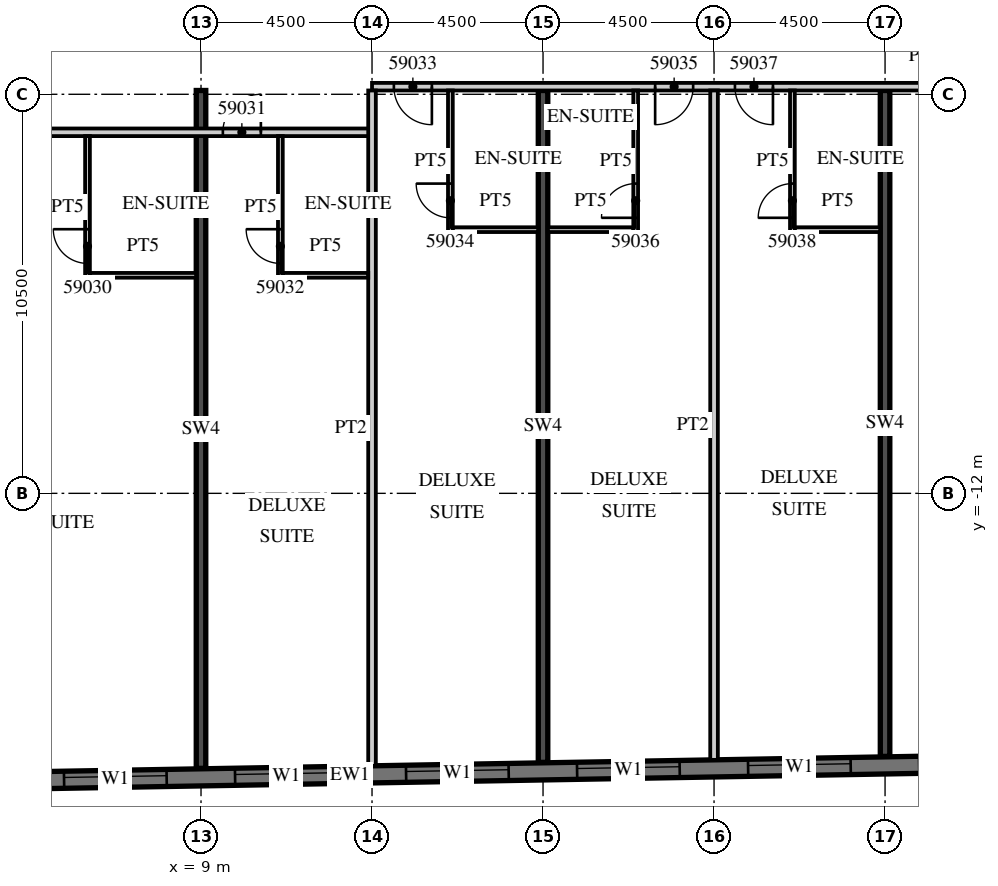
"""IFC4 building model, lengths in metres.
Left out: names, types, materials, properties, quantities, classifications, styles, units other than length and angle.
Written with IfcOpenShell. Run it as: python <this file> out.ifc"""

import sys

from ifc_helpers import new_model, si_unit, direction, frame, frame_2d, origin, place, context, subcontext, project, spatial, rectangle, extrude, element, fill, save


model = new_model("IFC4")
c1 = context("Model", 3, precision=1e-05, world=origin(), true_north=direction((0.0, 1.0)))
c2 = subcontext(c1, "Body", "Model", "MODEL_VIEW")
j1 = project(units=[si_unit("LENGTHUNIT", "METRE"), si_unit("PLANEANGLEUNIT", "RADIAN")], contexts=[c1])
p1 = place(None, origin())
s1 = spatial("IfcSite", under=j1, at=p1, CompositionType="ELEMENT")
p2 = place(p1, origin())
s2 = spatial("IfcBuilding", under=s1, at=p2, CompositionType="ELEMENT")
p3 = place(p2, frame((0.0, 0.0, 240.8)))
s3 = spatial("IfcBuildingStorey", under=s2, at=p3, CompositionType="ELEMENT", Elevation=240.8)
p4 = place(p3, frame((9.0, -19.236, 0.0), z_axis=(0.0, 0.0, 1.0), x_axis=(0.0, 1.0, 0.0)))
e1 = element("IfcWall", 1, at=p4, inside=s3, PredefinedType="SHEAR", context=c2, shape_type="SweptSolid", body=[
    extrude(rectangle(XDim=17.836, YDim=0.25, at=frame_2d((8.918, 0.0))), origin(), (0.0, 0.0, 1.0), 3.3),
])
p5 = place(p3, frame((18.0, -19.079, 0.0), z_axis=(0.0, 0.0, 1.0), x_axis=(0.0, 1.0, 0.0)))
e2 = element("IfcWall", 2, at=p5, inside=s3, PredefinedType="SHEAR", context=c2, shape_type="SweptSolid", body=[
    extrude(rectangle(XDim=17.679, YDim=0.25, at=frame_2d((8.84, 0.0))), origin(), (0.0, 0.0, 1.0), 3.3),
])
p6 = place(p3, frame((27.0, -18.922, 0.0), z_axis=(0.0, 0.0, 1.0), x_axis=(0.0, 1.0, 0.0)))
e3 = element("IfcWall", 3, at=p6, inside=s3, PredefinedType="SHEAR", context=c2, shape_type="SweptSolid", body=[
    extrude(rectangle(XDim=17.522, YDim=0.25, at=frame_2d((8.761, 0.0))), origin(), (0.0, 0.0, 1.0), 3.3),
])
p7 = place(p3, frame((-13.504, -19.866, 0.0), z_axis=(0.0, 0.0, 1.0), x_axis=(0.999847672978, 0.017453676992, 0.0)))
e4 = element("IfcWall", 4, at=p7, inside=s3, PredefinedType="SOLIDWALL", context=c2, shape_type="SweptSolid", body=[
    extrude(rectangle(XDim=52.86, YDim=0.45, at=frame_2d((26.43, 0.0))), origin(), (0.0, 0.0, 1.0), 3.02),
])
p8 = place(p7, frame((0.9, 0.0, 0.45)))
e5 = element("IfcOpeningElement", 5, at=p8, cuts=e4, PredefinedType="OPENING", context=c2, shape_type="SweptSolid", body=[
    extrude(rectangle(XDim=2.7, YDim=2.25, at=frame_2d((1.35, 1.125))), frame((0.0, 0.235, 0.0), z_axis=(0.0, -1.0, 0.0), x_axis=(1.0, 0.0, 0.0)), (0.0, 0.0, 1.0), 0.47),
])
p9 = place(p7, frame((5.401, 0.0, 0.45)))
e6 = element("IfcOpeningElement", 6, at=p9, cuts=e4, PredefinedType="OPENING", context=c2, shape_type="SweptSolid", body=[
    extrude(rectangle(XDim=2.7, YDim=2.25, at=frame_2d((1.35, 1.125))), frame((0.0, 0.235, 0.0), z_axis=(0.0, -1.0, 0.0), x_axis=(1.0, 0.0, 0.0)), (0.0, 0.0, 1.0), 0.47),
])
p10 = place(p7, frame((9.902, 0.0, 0.45)))
e7 = element("IfcOpeningElement", 7, at=p10, cuts=e4, PredefinedType="OPENING", context=c2, shape_type="SweptSolid", body=[
    extrude(rectangle(XDim=2.7, YDim=2.25, at=frame_2d((1.35, 1.125))), frame((0.0, 0.235, 0.0), z_axis=(0.0, -1.0, 0.0), x_axis=(1.0, 0.0, 0.0)), (0.0, 0.0, 1.0), 0.47),
])
p11 = place(p7, frame((14.402, 0.0, 0.45)))
e8 = element("IfcOpeningElement", 8, at=p11, cuts=e4, PredefinedType="OPENING", context=c2, shape_type="SweptSolid", body=[
    extrude(rectangle(XDim=2.7, YDim=2.25, at=frame_2d((1.35, 1.125))), frame((0.0, 0.235, 0.0), z_axis=(0.0, -1.0, 0.0), x_axis=(1.0, 0.0, 0.0)), (0.0, 0.0, 1.0), 0.47),
])
p12 = place(p7, frame((18.903, 0.0, 0.45)))
e9 = element("IfcOpeningElement", 9, at=p12, cuts=e4, PredefinedType="OPENING", context=c2, shape_type="SweptSolid", body=[
    extrude(rectangle(XDim=2.7, YDim=2.25, at=frame_2d((1.35, 1.125))), frame((0.0, 0.235, 0.0), z_axis=(0.0, -1.0, 0.0), x_axis=(1.0, 0.0, 0.0)), (0.0, 0.0, 1.0), 0.47),
])
p13 = place(p7, frame((23.404, 0.0, 0.45)))
e10 = element("IfcOpeningElement", 10, at=p13, cuts=e4, PredefinedType="OPENING", context=c2, shape_type="SweptSolid", body=[
    extrude(rectangle(XDim=2.7, YDim=2.25, at=frame_2d((1.35, 1.125))), frame((0.0, 0.235, 0.0), z_axis=(0.0, -1.0, 0.0), x_axis=(1.0, 0.0, 0.0)), (0.0, 0.0, 1.0), 0.47),
])
p14 = place(p7, frame((27.904, 0.0, 0.45)))
e11 = element("IfcOpeningElement", 11, at=p14, cuts=e4, PredefinedType="OPENING", context=c2, shape_type="SweptSolid", body=[
    extrude(rectangle(XDim=2.7, YDim=2.25, at=frame_2d((1.35, 1.125))), frame((0.0, 0.235, 0.0), z_axis=(0.0, -1.0, 0.0), x_axis=(1.0, 0.0, 0.0)), (0.0, 0.0, 1.0), 0.47),
])
p15 = place(p7, frame((32.405, 0.0, 0.45)))
e12 = element("IfcOpeningElement", 12, at=p15, cuts=e4, PredefinedType="OPENING", context=c2, shape_type="SweptSolid", body=[
    extrude(rectangle(XDim=2.7, YDim=2.25, at=frame_2d((1.35, 1.125))), frame((0.0, 0.235, 0.0), z_axis=(0.0, -1.0, 0.0), x_axis=(1.0, 0.0, 0.0)), (0.0, 0.0, 1.0), 0.47),
])
p16 = place(p7, frame((36.906, 0.0, 0.45)))
e13 = element("IfcOpeningElement", 13, at=p16, cuts=e4, PredefinedType="OPENING", context=c2, shape_type="SweptSolid", body=[
    extrude(rectangle(XDim=2.7, YDim=2.25, at=frame_2d((1.35, 1.125))), frame((0.0, 0.235, 0.0), z_axis=(0.0, -1.0, 0.0), x_axis=(1.0, 0.0, 0.0)), (0.0, 0.0, 1.0), 0.47),
])
p17 = place(p7, frame((41.406, 0.0, 0.45)))
e14 = element("IfcOpeningElement", 14, at=p17, cuts=e4, PredefinedType="OPENING", context=c2, shape_type="SweptSolid", body=[
    extrude(rectangle(XDim=2.7, YDim=2.25, at=frame_2d((1.35, 1.125))), frame((0.0, 0.235, 0.0), z_axis=(0.0, -1.0, 0.0), x_axis=(1.0, 0.0, 0.0)), (0.0, 0.0, 1.0), 0.47),
])
p18 = place(p7, frame((45.907, 0.0, 0.45)))
e15 = element("IfcOpeningElement", 15, at=p18, cuts=e4, PredefinedType="OPENING", context=c2, shape_type="SweptSolid", body=[
    extrude(rectangle(XDim=2.7, YDim=2.25, at=frame_2d((1.35, 1.125))), frame((0.0, 0.235, 0.0), z_axis=(0.0, -1.0, 0.0), x_axis=(1.0, 0.0, 0.0)), (0.0, 0.0, 1.0), 0.47),
])
p19 = place(p3, frame((-13.5, -2.5, 0.0), z_axis=(0.0, 0.0, 1.0), x_axis=(1.0, 0.0, 0.0)))
e16 = element("IfcWall", 16, at=p19, inside=s3, PredefinedType="PARTITIONING", context=c2, shape_type="SweptSolid", body=[
    extrude(rectangle(XDim=27.0, YDim=0.2, at=frame_2d((13.5, 0.0))), origin(), (0.0, 0.0, 1.0), 3.02),
])
p20 = place(p19, frame((0.575, 0.0, 0.0)))
e17 = element("IfcOpeningElement", 17, at=p20, cuts=e16, PredefinedType="OPENING", context=c2, shape_type="SweptSolid", body=[
    extrude(rectangle(XDim=1.0, YDim=2.1, at=frame_2d((0.5, 1.05))), frame((0.0, 0.11, 0.0), z_axis=(0.0, -1.0, 0.0), x_axis=(1.0, 0.0, 0.0)), (0.0, 0.0, 1.0), 0.22),
])
p21 = place(p19, frame((9.863, 0.0, 0.0)))
e18 = element("IfcOpeningElement", 18, at=p21, cuts=e16, PredefinedType="OPENING", context=c2, shape_type="SweptSolid", body=[
    extrude(rectangle(XDim=1.2, YDim=2.1, at=frame_2d((0.6, 1.05))), frame((0.0, 0.11, 0.0), z_axis=(0.0, -1.0, 0.0), x_axis=(1.0, 0.0, 0.0)), (0.0, 0.0, 1.0), 0.22),
])
p22 = place(p19, frame((15.938, 0.0, 0.0)))
e19 = element("IfcOpeningElement", 19, at=p22, cuts=e16, PredefinedType="OPENING", context=c2, shape_type="SweptSolid", body=[
    extrude(rectangle(XDim=1.2, YDim=2.1, at=frame_2d((0.6, 1.05))), frame((0.0, 0.11, 0.0), z_axis=(0.0, -1.0, 0.0), x_axis=(1.0, 0.0, 0.0)), (0.0, 0.0, 1.0), 0.22),
])
p23 = place(p19, frame((23.075, 0.0, 0.0)))
e20 = element("IfcOpeningElement", 20, at=p23, cuts=e16, PredefinedType="OPENING", context=c2, shape_type="SweptSolid", body=[
    extrude(rectangle(XDim=1.0, YDim=2.1, at=frame_2d((0.5, 1.05))), frame((0.0, 0.11, 0.0), z_axis=(0.0, -1.0, 0.0), x_axis=(1.0, 0.0, 0.0)), (0.0, 0.0, 1.0), 0.22),
])
p24 = place(p3, frame((13.5, -1.3, 0.0), z_axis=(0.0, 0.0, 1.0), x_axis=(1.0, 0.0, 0.0)))
e21 = element("IfcWall", 21, at=p24, inside=s3, PredefinedType="PARTITIONING", context=c2, shape_type="SweptSolid", body=[
    extrude(rectangle(XDim=29.091, YDim=0.2, at=frame_2d((14.545, 0.0))), origin(), (0.0, 0.0, 1.0), 3.02),
])
p25 = place(p24, frame((0.575, 0.0, 0.0)))
e22 = element("IfcOpeningElement", 22, at=p25, cuts=e21, PredefinedType="OPENING", context=c2, shape_type="SweptSolid", body=[
    extrude(rectangle(XDim=1.0, YDim=2.1, at=frame_2d((0.5, 1.05))), frame((0.0, 0.11, 0.0), z_axis=(0.0, -1.0, 0.0), x_axis=(1.0, 0.0, 0.0)), (0.0, 0.0, 1.0), 0.22),
])
p26 = place(p24, frame((7.45, 0.0, 0.0)))
e23 = element("IfcOpeningElement", 23, at=p26, cuts=e21, PredefinedType="OPENING", context=c2, shape_type="SweptSolid", body=[
    extrude(rectangle(XDim=1.0, YDim=2.1, at=frame_2d((0.5, 1.05))), frame((0.0, 0.11, 0.0), z_axis=(0.0, -1.0, 0.0), x_axis=(1.0, 0.0, 0.0)), (0.0, 0.0, 1.0), 0.22),
])
p27 = place(p24, frame((9.55, 0.0, 0.0)))
e24 = element("IfcOpeningElement", 24, at=p27, cuts=e21, PredefinedType="OPENING", context=c2, shape_type="SweptSolid", body=[
    extrude(rectangle(XDim=1.0, YDim=2.1, at=frame_2d((0.5, 1.05))), frame((0.0, 0.11, 0.0), z_axis=(0.0, -1.0, 0.0), x_axis=(1.0, 0.0, 0.0)), (0.0, 0.0, 1.0), 0.22),
])
p28 = place(p24, frame((15.938, 0.0, 0.0)))
e25 = element("IfcOpeningElement", 25, at=p28, cuts=e21, PredefinedType="OPENING", context=c2, shape_type="SweptSolid", body=[
    extrude(rectangle(XDim=1.2, YDim=2.1, at=frame_2d((0.6, 1.05))), frame((0.0, 0.11, 0.0), z_axis=(0.0, -1.0, 0.0), x_axis=(1.0, 0.0, 0.0)), (0.0, 0.0, 1.0), 0.22),
])
p29 = place(p24, frame((23.075, 0.0, 0.0)))
e26 = element("IfcOpeningElement", 26, at=p29, cuts=e21, PredefinedType="OPENING", context=c2, shape_type="SweptSolid", body=[
    extrude(rectangle(XDim=1.0, YDim=2.1, at=frame_2d((0.5, 1.05))), frame((0.0, 0.11, 0.0), z_axis=(0.0, -1.0, 0.0), x_axis=(1.0, 0.0, 0.0)), (0.0, 0.0, 1.0), 0.22),
])
p30 = place(p24, frame((27.611, 0.0, 0.0)))
e27 = element("IfcOpeningElement", 27, at=p30, cuts=e21, PredefinedType="OPENING", context=c2, shape_type="SweptSolid", body=[
    extrude(rectangle(XDim=1.0, YDim=2.4, at=frame_2d((0.5, 1.2))), frame((0.0, 0.11, 0.0), z_axis=(0.0, -1.0, 0.0), x_axis=(1.0, 0.0, 0.0)), (0.0, 0.0, 1.0), 0.22),
])
p31 = place(p3, frame((6.013, -6.325, 0.0), z_axis=(0.0, 0.0, 1.0), x_axis=(0.0, 1.0, 0.0)))
e28 = element("IfcWall", 28, at=p31, inside=s3, PredefinedType="PARTITIONING", context=c2, shape_type="SweptSolid", body=[
    extrude(rectangle(XDim=3.725, YDim=0.125, at=frame_2d((1.862, 0.0))), origin(), (0.0, 0.0, 1.0), 3.02),
])
p32 = place(p31, frame((0.375, 0.0, 0.0)))
e29 = element("IfcOpeningElement", 29, at=p32, cuts=e28, PredefinedType="OPENING", context=c2, shape_type="SweptSolid", body=[
    extrude(rectangle(XDim=0.9, YDim=2.1, at=frame_2d((0.45, 1.05))), frame((0.0, 0.073, 0.0), z_axis=(0.0, -1.0, 0.0), x_axis=(1.0, 0.0, 0.0)), (0.0, 0.0, 1.0), 0.145),
])
p33 = place(p3, frame((6.075, -6.263, 0.0), z_axis=(0.0, 0.0, 1.0), x_axis=(1.0, 0.0, 0.0)))
e30 = element("IfcWall", 30, at=p33, inside=s3, PredefinedType="PARTITIONING", context=c2, shape_type="SweptSolid", body=[
    extrude(rectangle(XDim=2.8, YDim=0.125, at=frame_2d((1.4, 0.0))), origin(), (0.0, 0.0, 1.0), 3.02),
])
p34 = place(p3, frame((13.5, -19.17, 0.0), z_axis=(0.0, 0.0, 1.0), x_axis=(0.0, 1.0, 0.0)))
e31 = element("IfcWall", 31, at=p34, inside=s3, PredefinedType="PARTITIONING", context=c2, shape_type="SweptSolid", body=[
    extrude(rectangle(XDim=17.77, YDim=0.2, at=frame_2d((8.885, 0.0))), origin(), (0.0, 0.0, 1.0), 3.02),
])
p35 = place(p3, frame((11.088, -6.325, 0.0), z_axis=(0.0, 0.0, 1.0), x_axis=(0.0, 1.0, 0.0)))
e32 = element("IfcWall", 32, at=p35, inside=s3, PredefinedType="PARTITIONING", context=c2, shape_type="SweptSolid", body=[
    extrude(rectangle(XDim=3.725, YDim=0.125, at=frame_2d((1.862, 0.0))), origin(), (0.0, 0.0, 1.0), 3.02),
])
p36 = place(p35, frame((0.375, 0.0, 0.0)))
e33 = element("IfcOpeningElement", 33, at=p36, cuts=e32, PredefinedType="OPENING", context=c2, shape_type="SweptSolid", body=[
    extrude(rectangle(XDim=0.9, YDim=2.1, at=frame_2d((0.45, 1.05))), frame((0.0, 0.073, 0.0), z_axis=(0.0, -1.0, 0.0), x_axis=(1.0, 0.0, 0.0)), (0.0, 0.0, 1.0), 0.145),
])
p37 = place(p3, frame((11.15, -6.263, 0.0), z_axis=(0.0, 0.0, 1.0), x_axis=(1.0, 0.0, 0.0)))
e34 = element("IfcWall", 34, at=p37, inside=s3, PredefinedType="PARTITIONING", context=c2, shape_type="SweptSolid", body=[
    extrude(rectangle(XDim=2.25, YDim=0.125, at=frame_2d((1.125, 0.0))), origin(), (0.0, 0.0, 1.0), 3.02),
])
p38 = place(p3, frame((15.562, -5.125, 0.0), z_axis=(0.0, 0.0, 1.0), x_axis=(0.0, 1.0, 0.0)))
e35 = element("IfcWall", 35, at=p38, inside=s3, PredefinedType="PARTITIONING", context=c2, shape_type="SweptSolid", body=[
    extrude(rectangle(XDim=3.725, YDim=0.125, at=frame_2d((1.863, 0.0))), origin(), (0.0, 0.0, 1.0), 3.02),
])
p39 = place(p38, frame((0.375, 0.0, 0.0)))
e36 = element("IfcOpeningElement", 36, at=p39, cuts=e35, PredefinedType="OPENING", context=c2, shape_type="SweptSolid", body=[
    extrude(rectangle(XDim=0.9, YDim=2.1, at=frame_2d((0.45, 1.05))), frame((0.0, 0.073, 0.0), z_axis=(0.0, -1.0, 0.0), x_axis=(1.0, 0.0, 0.0)), (0.0, 0.0, 1.0), 0.145),
])
p40 = place(p3, frame((15.625, -5.062, 0.0), z_axis=(0.0, 0.0, 1.0), x_axis=(1.0, 0.0, 0.0)))
e37 = element("IfcWall", 37, at=p40, inside=s3, PredefinedType="PARTITIONING", context=c2, shape_type="SweptSolid", body=[
    extrude(rectangle(XDim=2.25, YDim=0.125, at=frame_2d((1.125, 0.0))), origin(), (0.0, 0.0, 1.0), 3.02),
])
p41 = place(p3, frame((22.5, -19.013, 0.0), z_axis=(0.0, 0.0, 1.0), x_axis=(0.0, 1.0, 0.0)))
e38 = element("IfcWall", 38, at=p41, inside=s3, PredefinedType="PARTITIONING", context=c2, shape_type="SweptSolid", body=[
    extrude(rectangle(XDim=17.613, YDim=0.2, at=frame_2d((8.807, 0.0))), origin(), (0.0, 0.0, 1.0), 3.02),
])
p42 = place(p3, frame((20.438, -5.125, 0.0), z_axis=(0.0, 0.0, 1.0), x_axis=(0.0, 1.0, 0.0)))
e39 = element("IfcWall", 39, at=p42, inside=s3, PredefinedType="PARTITIONING", context=c2, shape_type="SweptSolid", body=[
    extrude(rectangle(XDim=3.725, YDim=0.125, at=frame_2d((1.863, 0.0))), origin(), (0.0, 0.0, 1.0), 3.02),
])
p43 = place(p42, frame((0.375, 0.0, 0.0)))
e40 = element("IfcOpeningElement", 40, at=p43, cuts=e39, PredefinedType="OPENING", context=c2, shape_type="SweptSolid", body=[
    extrude(rectangle(XDim=0.9, YDim=2.1, at=frame_2d((0.45, 1.05))), frame((0.0, 0.073, 0.0), z_axis=(0.0, -1.0, 0.0), x_axis=(1.0, 0.0, 0.0)), (0.0, 0.0, 1.0), 0.145),
])
p44 = place(p3, frame((18.125, -5.062, 0.0), z_axis=(0.0, 0.0, 1.0), x_axis=(1.0, 0.0, 0.0)))
e41 = element("IfcWall", 41, at=p44, inside=s3, PredefinedType="PARTITIONING", context=c2, shape_type="SweptSolid", body=[
    extrude(rectangle(XDim=2.25, YDim=0.125, at=frame_2d((1.125, 0.0))), origin(), (0.0, 0.0, 1.0), 3.02),
])
p45 = place(p3, frame((24.562, -5.125, 0.0), z_axis=(0.0, 0.0, 1.0), x_axis=(0.0, 1.0, 0.0)))
e42 = element("IfcWall", 42, at=p45, inside=s3, PredefinedType="PARTITIONING", context=c2, shape_type="SweptSolid", body=[
    extrude(rectangle(XDim=3.725, YDim=0.125, at=frame_2d((1.863, 0.0))), origin(), (0.0, 0.0, 1.0), 3.02),
])
p46 = place(p45, frame((0.375, 0.0, 0.0)))
e43 = element("IfcOpeningElement", 43, at=p46, cuts=e42, PredefinedType="OPENING", context=c2, shape_type="SweptSolid", body=[
    extrude(rectangle(XDim=0.9, YDim=2.1, at=frame_2d((0.45, 1.05))), frame((0.0, 0.073, 0.0), z_axis=(0.0, -1.0, 0.0), x_axis=(1.0, 0.0, 0.0)), (0.0, 0.0, 1.0), 0.145),
])
p47 = place(p3, frame((24.625, -5.062, 0.0), z_axis=(0.0, 0.0, 1.0), x_axis=(1.0, 0.0, 0.0)))
e44 = element("IfcWall", 44, at=p47, inside=s3, PredefinedType="PARTITIONING", context=c2, shape_type="SweptSolid", body=[
    extrude(rectangle(XDim=2.25, YDim=0.125, at=frame_2d((1.125, 0.0))), origin(), (0.0, 0.0, 1.0), 3.02),
])
p48 = place(p12, origin())
e45 = element("IfcWindow", 45, at=p48, inside=s3, PartitioningType="SINGLE_PANEL", PredefinedType="WINDOW", context=c2, shape_type="SweptSolid", body=[
    extrude(rectangle(XDim=2.7, YDim=2.25, at=frame_2d((1.35, 1.125))), frame((0.0, 0.09, 0.0), z_axis=(0.0, -1.0, 0.0), x_axis=(1.0, 0.0, 0.0)), (0.0, 0.0, 1.0), 0.06),
])
fill(e9, e45)
p49 = place(p13, origin())
e46 = element("IfcWindow", 46, at=p49, inside=s3, PartitioningType="SINGLE_PANEL", PredefinedType="WINDOW", context=c2, shape_type="SweptSolid", body=[
    extrude(rectangle(XDim=2.7, YDim=2.25, at=frame_2d((1.35, 1.125))), frame((0.0, 0.09, 0.0), z_axis=(0.0, -1.0, 0.0), x_axis=(1.0, 0.0, 0.0)), (0.0, 0.0, 1.0), 0.06),
])
fill(e10, e46)
p50 = place(p14, origin())
e47 = element("IfcWindow", 47, at=p50, inside=s3, PartitioningType="SINGLE_PANEL", PredefinedType="WINDOW", context=c2, shape_type="SweptSolid", body=[
    extrude(rectangle(XDim=2.7, YDim=2.25, at=frame_2d((1.35, 1.125))), frame((0.0, 0.09, 0.0), z_axis=(0.0, -1.0, 0.0), x_axis=(1.0, 0.0, 0.0)), (0.0, 0.0, 1.0), 0.06),
])
fill(e11, e47)
p51 = place(p15, origin())
e48 = element("IfcWindow", 48, at=p51, inside=s3, PartitioningType="SINGLE_PANEL", PredefinedType="WINDOW", context=c2, shape_type="SweptSolid", body=[
    extrude(rectangle(XDim=2.7, YDim=2.25, at=frame_2d((1.35, 1.125))), frame((0.0, 0.09, 0.0), z_axis=(0.0, -1.0, 0.0), x_axis=(1.0, 0.0, 0.0)), (0.0, 0.0, 1.0), 0.06),
])
fill(e12, e48)
p52 = place(p16, origin())
e49 = element("IfcWindow", 49, at=p52, inside=s3, PartitioningType="SINGLE_PANEL", PredefinedType="WINDOW", context=c2, shape_type="SweptSolid", body=[
    extrude(rectangle(XDim=2.7, YDim=2.25, at=frame_2d((1.35, 1.125))), frame((0.0, 0.09, 0.0), z_axis=(0.0, -1.0, 0.0), x_axis=(1.0, 0.0, 0.0)), (0.0, 0.0, 1.0), 0.06),
])
fill(e13, e49)
p53 = place(p32, origin())
e50 = element("IfcDoor", 50, at=p53, inside=s3, OperationType="SINGLE_SWING_RIGHT", PredefinedType="DOOR", context=c2, shape_type="SweptSolid", body=[
    extrude(rectangle(XDim=0.9, YDim=2.1, at=frame_2d((0.45, 1.05))), frame((0.0, 0.025, 0.0), z_axis=(0.0, -1.0, 0.0), x_axis=(1.0, 0.0, 0.0)), (0.0, 0.0, 1.0), 0.05),
])
fill(e29, e50)
p54 = place(p23, origin())
e51 = element("IfcDoor", 51, at=p54, inside=s3, OperationType="SINGLE_SWING_RIGHT", PredefinedType="DOOR", context=c2, shape_type="SweptSolid", body=[
    extrude(rectangle(XDim=1.0, YDim=2.1, at=frame_2d((0.5, 1.05))), frame((0.0, 0.025, 0.0), z_axis=(0.0, -1.0, 0.0), x_axis=(1.0, 0.0, 0.0)), (0.0, 0.0, 1.0), 0.05),
])
fill(e20, e51)
p55 = place(p36, origin())
e52 = element("IfcDoor", 52, at=p55, inside=s3, OperationType="SINGLE_SWING_RIGHT", PredefinedType="DOOR", context=c2, shape_type="SweptSolid", body=[
    extrude(rectangle(XDim=0.9, YDim=2.1, at=frame_2d((0.45, 1.05))), frame((0.0, 0.025, 0.0), z_axis=(0.0, -1.0, 0.0), x_axis=(1.0, 0.0, 0.0)), (0.0, 0.0, 1.0), 0.05),
])
fill(e33, e52)
p56 = place(p25, origin())
e53 = element("IfcDoor", 53, at=p56, inside=s3, OperationType="SINGLE_SWING_RIGHT", PredefinedType="DOOR", context=c2, shape_type="SweptSolid", body=[
    extrude(rectangle(XDim=1.0, YDim=2.1, at=frame_2d((0.5, 1.05))), frame((0.0, 0.025, 0.0), z_axis=(0.0, -1.0, 0.0), x_axis=(1.0, 0.0, 0.0)), (0.0, 0.0, 1.0), 0.05),
])
fill(e22, e53)
p57 = place(p39, origin())
e54 = element("IfcDoor", 54, at=p57, inside=s3, OperationType="SINGLE_SWING_RIGHT", PredefinedType="DOOR", context=c2, shape_type="SweptSolid", body=[
    extrude(rectangle(XDim=0.9, YDim=2.1, at=frame_2d((0.45, 1.05))), frame((0.0, 0.025, 0.0), z_axis=(0.0, -1.0, 0.0), x_axis=(1.0, 0.0, 0.0)), (0.0, 0.0, 1.0), 0.05),
])
fill(e36, e54)
p58 = place(p26, origin())
e55 = element("IfcDoor", 55, at=p58, inside=s3, OperationType="SINGLE_SWING_LEFT", PredefinedType="DOOR", context=c2, shape_type="SweptSolid", body=[
    extrude(rectangle(XDim=1.0, YDim=2.1, at=frame_2d((0.5, 1.05))), frame((0.0, 0.025, 0.0), z_axis=(0.0, -1.0, 0.0), x_axis=(1.0, 0.0, 0.0)), (0.0, 0.0, 1.0), 0.05),
])
fill(e23, e55)
p59 = place(p43, origin())
e56 = element("IfcDoor", 56, at=p59, inside=s3, OperationType="SINGLE_SWING_LEFT", PredefinedType="DOOR", context=c2, shape_type="SweptSolid", body=[
    extrude(rectangle(XDim=0.9, YDim=2.1, at=frame_2d((0.45, 1.05))), frame((0.0, 0.025, 0.0), z_axis=(0.0, -1.0, 0.0), x_axis=(1.0, 0.0, 0.0)), (0.0, 0.0, 1.0), 0.05),
])
fill(e40, e56)
p60 = place(p27, origin())
e57 = element("IfcDoor", 57, at=p60, inside=s3, OperationType="SINGLE_SWING_RIGHT", PredefinedType="DOOR", context=c2, shape_type="SweptSolid", body=[
    extrude(rectangle(XDim=1.0, YDim=2.1, at=frame_2d((0.5, 1.05))), frame((0.0, 0.025, 0.0), z_axis=(0.0, -1.0, 0.0), x_axis=(1.0, 0.0, 0.0)), (0.0, 0.0, 1.0), 0.05),
])
fill(e24, e57)
p61 = place(p46, origin())
e58 = element("IfcDoor", 58, at=p61, inside=s3, OperationType="SINGLE_SWING_LEFT", PredefinedType="DOOR", context=c2, shape_type="SweptSolid", body=[
    extrude(rectangle(XDim=0.9, YDim=2.1, at=frame_2d((0.45, 1.05))), frame((0.0, 0.025, 0.0), z_axis=(0.0, -1.0, 0.0), x_axis=(1.0, 0.0, 0.0)), (0.0, 0.0, 1.0), 0.05),
])
fill(e43, e58)
save(model, sys.argv[1])
